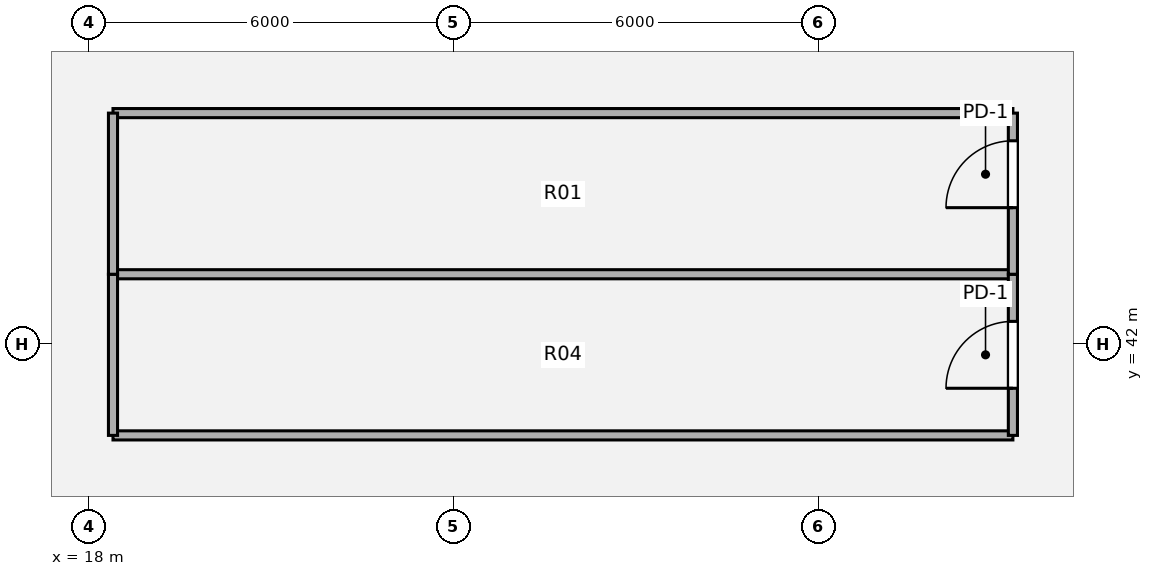
"""IFC4 building model, lengths in metres.
Left out: names, types, materials, properties, quantities, classifications, styles, units other than length and angle.
Written with IfcOpenShell. Run it as: python <this file> out.ifc"""

import sys

from ifc_helpers import new_model, si_unit, direction, frame, frame_2d, origin, origin_2d, place, context, subcontext, project, spatial, rectangle, hollow_circle, extrude, source, transform, mapped, element, fill, save


model = new_model("IFC4")
c1 = context("Model", 3, precision=1e-05, world=origin(), true_north=direction((0.0, 1.0)))
c2 = subcontext(c1, "Body", "Model", "MODEL_VIEW")
j1 = project(units=[si_unit("LENGTHUNIT", "METRE"), si_unit("PLANEANGLEUNIT", "RADIAN")], contexts=[c1])
p1 = place(None, origin())
s1 = spatial("IfcSite", under=j1, at=p1, CompositionType="ELEMENT")
p2 = place(p1, origin())
s2 = spatial("IfcBuilding", under=s1, at=p2, CompositionType="ELEMENT")
p3 = place(p2, frame((0.0, 0.0, 213.12)))
s3 = spatial("IfcBuildingStorey", under=s2, at=p3, CompositionType="ELEMENT", Elevation=213.12)
m1 = source(origin(), c2, "Body", "SweptSolid", [
    extrude(hollow_circle(Radius=0.55, WallThickness=0.04, at=origin_2d()), origin(), (0.0, 0.0, 1.0), 6.834),
])
p4 = place(p3, frame((17.825, 35.308, 0.393), z_axis=(0.14060814626, 0.665995343173, 0.732584160406), x_axis=(-0.978431573463, 0.206571188819, 0.0)))
e1 = element("IfcColumn", 1, at=p4, inside=s3, PredefinedType="COLUMN", context=c2, shape_type="MappedRepresentation", body=[
    mapped(m1, transform((0.0, 0.0, 0.0), x_axis=(1.0, 0.0, 0.0), y_axis=(0.0, 1.0, 0.0), z_axis=(0.0, 0.0, 1.0), scale=1.0)),
])
m2 = source(origin(), c2, "Body", "SweptSolid", [
    extrude(hollow_circle(Radius=0.55, WallThickness=0.04, at=origin_2d()), origin(), (0.0, 0.0, 1.0), 6.654),
])
p5 = place(p3, frame((17.823, 46.372, 0.38), z_axis=(0.144787640701, 0.640169783911, 0.754466160187), x_axis=(-0.975364614576, 0.220598886291, 0.0)))
e2 = element("IfcColumn", 2, at=p5, inside=s3, PredefinedType="COLUMN", context=c2, shape_type="MappedRepresentation", body=[
    mapped(m2, transform((0.0, 0.0, 0.0), x_axis=(1.0, 0.0, 0.0), y_axis=(0.0, 1.0, 0.0), z_axis=(0.0, 0.0, 1.0), scale=1.0)),
])
m3 = source(origin(), c2, "Body", "SweptSolid", [
    extrude(hollow_circle(Radius=0.55, WallThickness=0.04, at=origin_2d()), origin(), (0.0, 0.0, 1.0), 6.772),
])
p6 = place(p3, frame((31.35, 35.304, 0.389), z_axis=(0.0, 0.672670999613, 0.73994170465), x_axis=(-1.0, 0.0, 0.0)))
e3 = element("IfcColumn", 3, at=p6, inside=s3, PredefinedType="COLUMN", context=c2, shape_type="MappedRepresentation", body=[
    mapped(m3, transform((0.0, 0.0, 0.0), x_axis=(1.0, 0.0, 0.0), y_axis=(0.0, 1.0, 0.0), z_axis=(0.0, 0.0, 1.0), scale=1.0)),
])
p7 = place(p3, frame((18.4, 40.5, 0.0), z_axis=(0.0, 0.0, 1.0), x_axis=(1.0, 0.0, 0.0)))
e4 = element("IfcWall", 4, at=p7, inside=s3, PredefinedType="PARTITIONING", context=c2, shape_type="SweptSolid", body=[
    extrude(rectangle(XDim=14.8, YDim=0.15, at=frame_2d((7.4, 0.0))), origin(), (0.0, 0.0, 1.0), 5.05),
])
for number, where, z_axis, x_axis in (
    (5, (18.4, 43.15, 0.0), (0.0, 0.0, 1.0), (1.0, 0.0, 0.0)),
    (6, (18.4, 45.8, 0.0), (0.0, 0.0, 1.0), (1.0, 0.0, 0.0)),
):
    element("IfcWall", number, at=place(p3, frame(where, z_axis=z_axis, x_axis=x_axis)), inside=s3, PredefinedType="PARTITIONING", context=c2, shape_type="SweptSolid", body=[
        extrude(rectangle(XDim=14.8, YDim=0.15, at=frame_2d((7.4, 0.0))), origin(), (0.0, 0.0, 1.0), 4.532),
    ])
p8 = place(p3, frame((18.4, 40.5, 0.0), z_axis=(0.0, 0.0, 1.0), x_axis=(0.0, 1.0, 0.0)))
e7 = element("IfcWall", 7, at=p8, inside=s3, PredefinedType="PARTITIONING", context=c2, shape_type="SweptSolid", body=[
    extrude(rectangle(XDim=2.65, YDim=0.15, at=frame_2d((1.325, 0.0))), origin(), (0.0, 0.0, 1.0), 5.05),
])
p9 = place(p3, frame((18.4, 43.15, 0.0), z_axis=(0.0, 0.0, 1.0), x_axis=(0.0, 1.0, 0.0)))
e8 = element("IfcWall", 8, at=p9, inside=s3, PredefinedType="PARTITIONING", context=c2, shape_type="SweptSolid", body=[
    extrude(rectangle(XDim=2.65, YDim=0.15, at=frame_2d((1.325, 0.0))), origin(), (0.0, 0.0, 1.0), 5.05),
])
p10 = place(p3, frame((33.2, 40.5, 0.0), z_axis=(0.0, 0.0, 1.0), x_axis=(0.0, 1.0, 0.0)))
e9 = element("IfcWall", 9, at=p10, inside=s3, PredefinedType="PARTITIONING", context=c2, shape_type="SweptSolid", body=[
    extrude(rectangle(XDim=2.65, YDim=0.15, at=frame_2d((1.325, 0.0))), origin(), (0.0, 0.0, 1.0), 5.05),
])
p11 = place(p10, frame((0.775, 0.0, 0.0)))
e10 = element("IfcOpeningElement", 10, at=p11, cuts=e9, PredefinedType="OPENING", context=c2, shape_type="SweptSolid", body=[
    extrude(rectangle(XDim=1.1, YDim=2.1, at=origin_2d()), frame((0.55, 0.085, 1.05), z_axis=(0.0, -1.0, 0.0), x_axis=(1.0, 0.0, 0.0)), (0.0, 0.0, 1.0), 0.17),
])
p12 = place(p3, frame((33.2, 43.15, 0.0), z_axis=(0.0, 0.0, 1.0), x_axis=(0.0, 1.0, 0.0)))
e11 = element("IfcWall", 11, at=p12, inside=s3, PredefinedType="PARTITIONING", context=c2, shape_type="SweptSolid", body=[
    extrude(rectangle(XDim=2.65, YDim=0.15, at=frame_2d((1.325, 0.0))), origin(), (0.0, 0.0, 1.0), 5.05),
])
p13 = place(p12, frame((1.095, 0.0, 0.0)))
e12 = element("IfcOpeningElement", 12, at=p13, cuts=e11, PredefinedType="OPENING", context=c2, shape_type="SweptSolid", body=[
    extrude(rectangle(XDim=1.1, YDim=2.1, at=origin_2d()), frame((0.55, 0.085, 1.05), z_axis=(0.0, -1.0, 0.0), x_axis=(1.0, 0.0, 0.0)), (0.0, 0.0, 1.0), 0.17),
])
m4 = source(origin(), c2, "Body", "SweptSolid", [
    extrude(rectangle(XDim=1.1, YDim=2.1, at=origin_2d()), frame((0.55, 0.025, 1.05), z_axis=(0.0, -1.0, 0.0), x_axis=(1.0, 0.0, 0.0)), (0.0, 0.0, 1.0), 0.05),
])
p14 = place(p11, origin())
e13 = element("IfcDoor", 13, at=p14, inside=s3, OperationType="SINGLE_SWING_LEFT", PredefinedType="DOOR", context=c2, shape_type="MappedRepresentation", body=[
    mapped(m4, transform((0.0, 0.0, 0.0), x_axis=(1.0, 0.0, 0.0), y_axis=(0.0, 1.0, 0.0), z_axis=(0.0, 0.0, 1.0), scale=1.0)),
])
fill(e10, e13)
p15 = place(p13, origin())
e14 = element("IfcDoor", 14, at=p15, inside=s3, OperationType="SINGLE_SWING_LEFT", PredefinedType="DOOR", context=c2, shape_type="MappedRepresentation", body=[
    mapped(m4, transform((0.0, 0.0, 0.0), x_axis=(1.0, 0.0, 0.0), y_axis=(0.0, 1.0, 0.0), z_axis=(0.0, 0.0, 1.0), scale=1.0)),
])
fill(e12, e14)
save(model, sys.argv[1])
